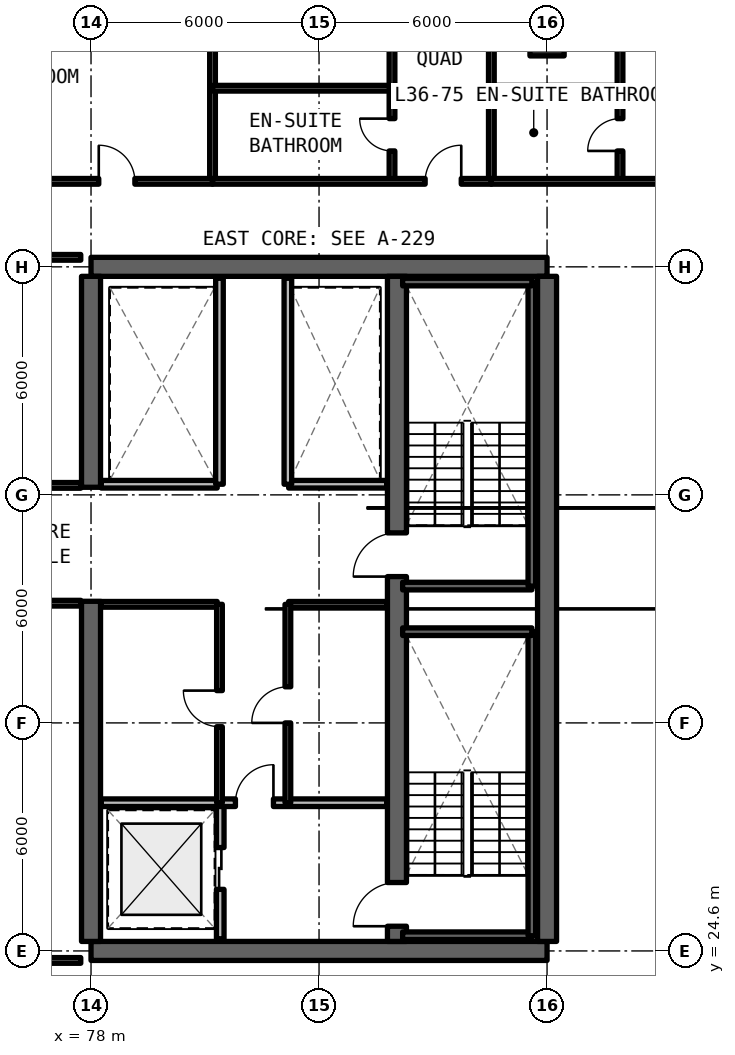
"""IFC4 building model, lengths in metres.
Left out: names, types, materials, properties, quantities, classifications, styles, units other than length and angle.
Written with IfcOpenShell. Run it as: python <this file> out.ifc"""

import sys

from ifc_helpers import new_model, si_unit, direction, frame, frame_2d, origin, origin_2d, place, context, subcontext, project, spatial, rectangle, extrude, element, fill, save


model = new_model("IFC4")
c1 = context("Model", 3, precision=1e-05, world=origin(), true_north=direction((0.0, 1.0)))
c2 = subcontext(c1, "Body", "Model", "MODEL_VIEW")
j1 = project(units=[si_unit("LENGTHUNIT", "METRE"), si_unit("PLANEANGLEUNIT", "RADIAN")], contexts=[c1])
p1 = place(None, origin())
s1 = spatial("IfcSite", under=j1, at=p1, CompositionType="ELEMENT")
p2 = place(p1, origin())
s2 = spatial("IfcBuilding", under=s1, at=p2, CompositionType="ELEMENT")
p3 = place(p2, frame((0.0, 0.0, 132.0)))
s3 = spatial("IfcBuildingStorey", under=s2, at=p3, CompositionType="ELEMENT", Elevation=132.0)
for number, where, z_axis, x_axis in (
    (1, (78.0, 24.6, 0.0), (0.0, 0.0, 1.0), (1.0, 0.0, 0.0)),
    (2, (90.0, 42.6, 0.0), (0.0, 0.0, 1.0), (-1.0, 0.0, 0.0)),
):
    element("IfcWall", number, at=place(p3, frame(where, z_axis=z_axis, x_axis=x_axis)), inside=s3, PredefinedType="SHEAR", context=c2, shape_type="SweptSolid", body=[
        extrude(rectangle(XDim=12.0, YDim=0.5, at=frame_2d((6.0, 0.0))), origin(), (0.0, 0.0, 1.0), 3.3),
    ])
p4 = place(p3, frame((90.0, 24.85, 0.0), z_axis=(0.0, 0.0, 1.0), x_axis=(0.0, 1.0, 0.0)))
e3 = element("IfcWall", 3, at=p4, inside=s3, PredefinedType="SHEAR", context=c2, shape_type="SweptSolid", body=[
    extrude(rectangle(XDim=17.5, YDim=0.5, at=frame_2d((8.75, 0.0))), origin(), (0.0, 0.0, 1.0), 3.3),
])
p5 = place(p3, frame((78.0, 24.85, 0.0), z_axis=(0.0, 0.0, 1.0), x_axis=(0.0, 1.0, 0.0)))
e4 = element("IfcWall", 4, at=p5, inside=s3, PredefinedType="SHEAR", context=c2, shape_type="SweptSolid", body=[
    extrude(rectangle(XDim=8.95, YDim=0.5, at=frame_2d((4.475, 0.0))), origin(), (0.0, 0.0, 1.0), 3.3),
])
p6 = place(p3, frame((78.0, 36.8, 0.0), z_axis=(0.0, 0.0, 1.0), x_axis=(0.0, 1.0, 0.0)))
e5 = element("IfcWall", 5, at=p6, inside=s3, PredefinedType="SHEAR", context=c2, shape_type="SweptSolid", body=[
    extrude(rectangle(XDim=5.55, YDim=0.5, at=frame_2d((2.775, 0.0))), origin(), (0.0, 0.0, 1.0), 3.3),
])
p7 = place(p3, frame((86.05, 24.85, 0.0), z_axis=(0.0, 0.0, 1.0), x_axis=(0.0, 1.0, 0.0)))
e6 = element("IfcWall", 6, at=p7, inside=s3, PredefinedType="SHEAR", context=c2, shape_type="SweptSolid", body=[
    extrude(rectangle(XDim=17.5, YDim=0.5, at=frame_2d((8.75, 0.0))), origin(), (0.0, 0.0, 1.0), 3.3),
])
p8 = place(p7, frame((0.4, 0.0, 0.0)))
e7 = element("IfcOpeningElement", 7, at=p8, cuts=e6, PredefinedType="OPENING", context=c2, shape_type="SweptSolid", body=[
    extrude(rectangle(XDim=1.15, YDim=2.15, at=frame_2d((0.575, 1.075))), frame((0.0, 0.26, 0.0), z_axis=(0.0, -1.0, 0.0), x_axis=(1.0, 0.0, 0.0)), (0.0, 0.0, 1.0), 0.52),
])
p9 = place(p7, frame((9.6, 0.0, 0.0)))
e8 = element("IfcOpeningElement", 8, at=p9, cuts=e6, PredefinedType="OPENING", context=c2, shape_type="SweptSolid", body=[
    extrude(rectangle(XDim=1.15, YDim=2.15, at=frame_2d((0.575, 1.075))), frame((0.0, 0.26, 0.0), z_axis=(0.0, -1.0, 0.0), x_axis=(1.0, 0.0, 0.0)), (0.0, 0.0, 1.0), 0.52),
])
p10 = place(p3, frame((90.0, 48.6, 0.0), z_axis=(0.0, 0.0, 1.0), x_axis=(1.0, 0.0, 0.0)))
e9 = element("IfcColumn", 9, at=p10, inside=s3, PredefinedType="COLUMN", context=c2, shape_type="SweptSolid", body=[
    extrude(rectangle(XDim=0.9, YDim=0.9, at=origin_2d()), origin(), (0.0, 0.0, 1.0), 3.3),
])
p11 = place(p3, frame((81.4, 24.92, 0.0), z_axis=(0.0, 0.0, 1.0), x_axis=(0.0, 1.0, 0.0)))
e10 = element("IfcWall", 10, at=p11, inside=s3, PredefinedType="SOLIDWALL", context=c2, shape_type="SweptSolid", body=[
    extrude(rectangle(XDim=3.58, YDim=0.2, at=frame_2d((1.79, 0.0))), origin(), (0.0, 0.0, 1.0), 2.35),
])
p12 = place(p11, frame((1.3, 0.0, 0.0)))
e11 = element("IfcOpeningElement", 11, at=p12, cuts=e10, PredefinedType="OPENING", context=c2, shape_type="SweptSolid", body=[
    extrude(rectangle(XDim=1.1, YDim=2.2, at=frame_2d((0.55, 1.1))), frame((0.0, 0.11, 0.0), z_axis=(0.0, -1.0, 0.0), x_axis=(1.0, 0.0, 0.0)), (0.0, 0.0, 1.0), 0.22),
])
p13 = place(p3, frame((78.27, 28.5, 0.0), z_axis=(0.0, 0.0, 1.0), x_axis=(1.0, 0.0, 0.0)))
e12 = element("IfcWall", 12, at=p13, inside=s3, PredefinedType="SOLIDWALL", context=c2, shape_type="SweptSolid", body=[
    extrude(rectangle(XDim=7.51, YDim=0.2, at=frame_2d((3.755, 0.0))), origin(), (0.0, 0.0, 1.0), 2.35),
])
p14 = place(p13, frame((3.53, 0.0, 0.0)))
e13 = element("IfcOpeningElement", 13, at=p14, cuts=e12, PredefinedType="OPENING", context=c2, shape_type="SweptSolid", body=[
    extrude(rectangle(XDim=1.0, YDim=2.15, at=frame_2d((0.5, 1.075))), frame((0.0, 0.11, 0.0), z_axis=(0.0, -1.0, 0.0), x_axis=(1.0, 0.0, 0.0)), (0.0, 0.0, 1.0), 0.22),
])
p15 = place(p3, frame((83.2, 33.72, 0.0), z_axis=(0.0, 0.0, 1.0), x_axis=(1.0, 0.0, 0.0)))
e14 = element("IfcWall", 14, at=p15, inside=s3, PredefinedType="SOLIDWALL", context=c2, shape_type="SweptSolid", body=[
    extrude(rectangle(XDim=2.58, YDim=0.15, at=frame_2d((1.29, 0.0))), origin(), (0.0, 0.0, 1.0), 2.35),
])
p16 = place(p3, frame((83.18, 28.5, 0.0), z_axis=(0.0, 0.0, 1.0), x_axis=(0.0, 1.0, 0.0)))
e15 = element("IfcWall", 15, at=p16, inside=s3, PredefinedType="SOLIDWALL", context=c2, shape_type="SweptSolid", body=[
    extrude(rectangle(XDim=5.22, YDim=0.15, at=frame_2d((2.61, 0.0))), origin(), (0.0, 0.0, 1.0), 2.35),
])
p17 = place(p16, frame((2.1, 0.0, 0.0)))
e16 = element("IfcOpeningElement", 16, at=p17, cuts=e15, PredefinedType="OPENING", context=c2, shape_type="SweptSolid", body=[
    extrude(rectangle(XDim=0.95, YDim=2.15, at=frame_2d((0.475, 1.075))), frame((0.0, 0.085, 0.0), z_axis=(0.0, -1.0, 0.0), x_axis=(1.0, 0.0, 0.0)), (0.0, 0.0, 1.0), 0.17),
])
p18 = place(p3, frame((78.27, 33.72, 0.0), z_axis=(0.0, 0.0, 1.0), x_axis=(1.0, 0.0, 0.0)))
e17 = element("IfcWall", 17, at=p18, inside=s3, PredefinedType="SOLIDWALL", context=c2, shape_type="SweptSolid", body=[
    extrude(rectangle(XDim=3.05, YDim=0.15, at=frame_2d((1.525, 0.0))), origin(), (0.0, 0.0, 1.0), 2.35),
])
p19 = place(p3, frame((81.38, 28.5, 0.0), z_axis=(0.0, 0.0, 1.0), x_axis=(0.0, 1.0, 0.0)))
e18 = element("IfcWall", 18, at=p19, inside=s3, PredefinedType="SOLIDWALL", context=c2, shape_type="SweptSolid", body=[
    extrude(rectangle(XDim=5.22, YDim=0.15, at=frame_2d((2.61, 0.0))), origin(), (0.0, 0.0, 1.0), 2.35),
])
p20 = place(p19, frame((2.0, 0.0, 0.0)))
e19 = element("IfcOpeningElement", 19, at=p20, cuts=e18, PredefinedType="OPENING", context=c2, shape_type="SweptSolid", body=[
    extrude(rectangle(XDim=0.95, YDim=2.15, at=frame_2d((0.475, 1.075))), frame((0.0, 0.085, 0.0), z_axis=(0.0, -1.0, 0.0), x_axis=(1.0, 0.0, 0.0)), (0.0, 0.0, 1.0), 0.17),
])
p21 = place(p3, frame((83.2, 36.88, 0.0), z_axis=(0.0, 0.0, 1.0), x_axis=(1.0, 0.0, 0.0)))
e20 = element("IfcWall", 20, at=p21, inside=s3, PredefinedType="SOLIDWALL", context=c2, shape_type="SweptSolid", body=[
    extrude(rectangle(XDim=2.58, YDim=0.2, at=frame_2d((1.29, 0.0))), origin(), (0.0, 0.0, 1.0), 2.35),
])
p22 = place(p3, frame((83.18, 36.88, 0.0), z_axis=(0.0, 0.0, 1.0), x_axis=(0.0, 1.0, 0.0)))
e21 = element("IfcWall", 21, at=p22, inside=s3, PredefinedType="SOLIDWALL", context=c2, shape_type="SweptSolid", body=[
    extrude(rectangle(XDim=5.42, YDim=0.2, at=frame_2d((2.71, 0.0))), origin(), (0.0, 0.0, 1.0), 2.35),
])
p23 = place(p3, frame((78.27, 36.88, 0.0), z_axis=(0.0, 0.0, 1.0), x_axis=(1.0, 0.0, 0.0)))
e22 = element("IfcWall", 22, at=p23, inside=s3, PredefinedType="SOLIDWALL", context=c2, shape_type="SweptSolid", body=[
    extrude(rectangle(XDim=3.05, YDim=0.2, at=frame_2d((1.525, 0.0))), origin(), (0.0, 0.0, 1.0), 2.35),
])
p24 = place(p3, frame((81.38, 36.88, 0.0), z_axis=(0.0, 0.0, 1.0), x_axis=(0.0, 1.0, 0.0)))
e23 = element("IfcWall", 23, at=p24, inside=s3, PredefinedType="SOLIDWALL", context=c2, shape_type="SweptSolid", body=[
    extrude(rectangle(XDim=5.42, YDim=0.2, at=frame_2d((2.71, 0.0))), origin(), (0.0, 0.0, 1.0), 2.35),
])
p25 = place(p3, frame((69.85, 24.35, 0.0), z_axis=(0.0, 0.0, 1.0), x_axis=(1.0, 0.0, 0.0)))
e24 = element("IfcWall", 24, at=p25, inside=s3, PredefinedType="SOLIDWALL", context=c2, shape_type="SweptSolid", body=[
    extrude(rectangle(XDim=7.88, YDim=0.15, at=frame_2d((3.94, 0.0))), origin(), (0.0, 0.0, 1.0), 2.35),
])
p26 = place(p3, frame((69.85, 33.75, 0.0), z_axis=(0.0, 0.0, 1.0), x_axis=(1.0, 0.0, 0.0)))
e25 = element("IfcWall", 25, at=p26, inside=s3, PredefinedType="SOLIDWALL", context=c2, shape_type="SweptSolid", body=[
    extrude(rectangle(XDim=7.88, YDim=0.15, at=frame_2d((3.94, 0.0))), origin(), (0.0, 0.0, 1.0), 2.35),
])
p27 = place(p26, frame((3.465, 0.0, 0.0)))
e26 = element("IfcOpeningElement", 26, at=p27, cuts=e25, PredefinedType="OPENING", context=c2, shape_type="SweptSolid", body=[
    extrude(rectangle(XDim=0.95, YDim=2.15, at=frame_2d((0.475, 1.075))), frame((0.0, 0.085, 0.0), z_axis=(0.0, -1.0, 0.0), x_axis=(1.0, 0.0, 0.0)), (0.0, 0.0, 1.0), 0.17),
])
p28 = place(p3, frame((69.85, 36.85, 0.0), z_axis=(0.0, 0.0, 1.0), x_axis=(1.0, 0.0, 0.0)))
e27 = element("IfcWall", 27, at=p28, inside=s3, PredefinedType="SOLIDWALL", context=c2, shape_type="SweptSolid", body=[
    extrude(rectangle(XDim=7.88, YDim=0.15, at=frame_2d((3.94, 0.0))), origin(), (0.0, 0.0, 1.0), 2.35),
])
p29 = place(p28, frame((3.465, 0.0, 0.0)))
e28 = element("IfcOpeningElement", 28, at=p29, cuts=e27, PredefinedType="OPENING", context=c2, shape_type="SweptSolid", body=[
    extrude(rectangle(XDim=0.95, YDim=2.15, at=frame_2d((0.475, 1.075))), frame((0.0, 0.085, 0.0), z_axis=(0.0, -1.0, 0.0), x_axis=(1.0, 0.0, 0.0)), (0.0, 0.0, 1.0), 0.17),
])
p30 = place(p3, frame((69.85, 42.85, 0.0), z_axis=(0.0, 0.0, 1.0), x_axis=(1.0, 0.0, 0.0)))
e29 = element("IfcWall", 29, at=p30, inside=s3, PredefinedType="SOLIDWALL", context=c2, shape_type="SweptSolid", body=[
    extrude(rectangle(XDim=7.88, YDim=0.15, at=frame_2d((3.94, 0.0))), origin(), (0.0, 0.0, 1.0), 2.35),
])
p31 = place(p3, frame((81.197, 44.85, 0.0), z_axis=(0.0, 0.0, 1.0), x_axis=(0.0, 1.0, 0.0)))
e30 = element("IfcWall", 30, at=p31, inside=s3, PredefinedType="SOLIDWALL", context=c2, shape_type="SweptSolid", body=[
    extrude(rectangle(XDim=10.2, YDim=0.15, at=frame_2d((5.1, 0.0))), origin(), (0.0, 0.0, 1.0), 2.35),
])
p32 = place(p3, frame((74.132, 44.85, 0.0), z_axis=(0.0, 0.0, 1.0), x_axis=(1.0, 0.0, 0.0)))
e31 = element("IfcWall", 31, at=p32, inside=s3, PredefinedType="SOLIDWALL", context=c2, shape_type="SweptSolid", body=[
    extrude(rectangle(XDim=7.066, YDim=0.15, at=frame_2d((3.533, 0.0))), origin(), (0.0, 0.0, 1.0), 2.35),
])
p33 = place(p32, frame((4.072, 0.0, 0.0)))
e32 = element("IfcOpeningElement", 32, at=p33, cuts=e31, PredefinedType="OPENING", context=c2, shape_type="SweptSolid", body=[
    extrude(rectangle(XDim=0.95, YDim=2.15, at=frame_2d((0.475, 1.075))), frame((0.0, 0.085, 0.0), z_axis=(0.0, -1.0, 0.0), x_axis=(1.0, 0.0, 0.0)), (0.0, 0.0, 1.0), 0.17),
])
p34 = place(p3, frame((88.534, 44.85, 0.0), z_axis=(0.0, 0.0, 1.0), x_axis=(0.0, 1.0, 0.0)))
e33 = element("IfcWall", 33, at=p34, inside=s3, PredefinedType="SOLIDWALL", context=c2, shape_type="SweptSolid", body=[
    extrude(rectangle(XDim=10.2, YDim=0.15, at=frame_2d((5.1, 0.0))), origin(), (0.0, 0.0, 1.0), 2.35),
])
p35 = place(p3, frame((81.197, 47.3, 0.0), z_axis=(0.0, 0.0, 1.0), x_axis=(1.0, 0.0, 0.0)))
e34 = element("IfcWall", 34, at=p35, inside=s3, PredefinedType="PARTITIONING", context=c2, shape_type="SweptSolid", body=[
    extrude(rectangle(XDim=4.723, YDim=0.15, at=frame_2d((2.361, 0.0))), origin(), (0.0, 0.0, 1.0), 2.35),
])
p36 = place(p3, frame((85.92, 44.85, 0.0), z_axis=(0.0, 0.0, 1.0), x_axis=(0.0, 1.0, 0.0)))
e35 = element("IfcWall", 35, at=p36, inside=s3, PredefinedType="PARTITIONING", context=c2, shape_type="SweptSolid", body=[
    extrude(rectangle(XDim=10.2, YDim=0.15, at=frame_2d((5.1, 0.0))), origin(), (0.0, 0.0, 1.0), 2.35),
])
p37 = place(p36, frame((0.8, 0.0, 0.0)))
e36 = element("IfcOpeningElement", 36, at=p37, cuts=e35, PredefinedType="OPENING", context=c2, shape_type="SweptSolid", body=[
    extrude(rectangle(XDim=0.85, YDim=2.1, at=frame_2d((0.425, 1.05))), frame((0.0, 0.085, 0.0), z_axis=(0.0, -1.0, 0.0), x_axis=(1.0, 0.0, 0.0)), (0.0, 0.0, 1.0), 0.17),
])
p38 = place(p36, frame((5.21, 0.0, 0.0)))
e37 = element("IfcOpeningElement", 37, at=p38, cuts=e35, PredefinedType="OPENING", context=c2, shape_type="SweptSolid", body=[
    extrude(rectangle(XDim=0.85, YDim=2.1, at=frame_2d((0.425, 1.05))), frame((0.0, 0.085, 0.0), z_axis=(0.0, -1.0, 0.0), x_axis=(1.0, 0.0, 0.0)), (0.0, 0.0, 1.0), 0.17),
])
p39 = place(p3, frame((81.197, 44.85, 0.0), z_axis=(0.0, 0.0, 1.0), x_axis=(1.0, 0.0, 0.0)))
e38 = element("IfcWall", 38, at=p39, inside=s3, PredefinedType="SOLIDWALL", context=c2, shape_type="SweptSolid", body=[
    extrude(rectangle(XDim=7.337, YDim=0.15, at=frame_2d((3.668, 0.0))), origin(), (0.0, 0.0, 1.0), 2.35),
])
p40 = place(p39, frame((5.595, 0.0, 0.0)))
e39 = element("IfcOpeningElement", 39, at=p40, cuts=e38, PredefinedType="OPENING", context=c2, shape_type="SweptSolid", body=[
    extrude(rectangle(XDim=0.95, YDim=2.15, at=frame_2d((0.475, 1.075))), frame((0.0, 0.085, 0.0), z_axis=(0.0, -1.0, 0.0), x_axis=(1.0, 0.0, 0.0)), (0.0, 0.0, 1.0), 0.17),
])
p41 = place(p3, frame((88.534, 47.3, 0.0), z_axis=(0.0, 0.0, 1.0), x_axis=(1.0, 0.0, 0.0)))
e40 = element("IfcWall", 40, at=p41, inside=s3, PredefinedType="PARTITIONING", context=c2, shape_type="SweptSolid", body=[
    extrude(rectangle(XDim=3.385, YDim=0.15, at=frame_2d((1.693, 0.0))), origin(), (0.0, 0.0, 1.0), 2.35),
])
p42 = place(p3, frame((91.92, 44.85, 0.0), z_axis=(0.0, 0.0, 1.0), x_axis=(0.0, 1.0, 0.0)))
e41 = element("IfcWall", 41, at=p42, inside=s3, PredefinedType="PARTITIONING", context=c2, shape_type="SweptSolid", body=[
    extrude(rectangle(XDim=10.2, YDim=0.15, at=frame_2d((5.1, 0.0))), origin(), (0.0, 0.0, 1.0), 2.35),
])
p43 = place(p42, frame((0.8, 0.0, 0.0)))
e42 = element("IfcOpeningElement", 42, at=p43, cuts=e41, PredefinedType="OPENING", context=c2, shape_type="SweptSolid", body=[
    extrude(rectangle(XDim=0.85, YDim=2.1, at=frame_2d((0.425, 1.05))), frame((0.0, 0.085, 0.0), z_axis=(0.0, -1.0, 0.0), x_axis=(1.0, 0.0, 0.0)), (0.0, 0.0, 1.0), 0.17),
])
p44 = place(p42, frame((5.21, 0.0, 0.0)))
e43 = element("IfcOpeningElement", 43, at=p44, cuts=e41, PredefinedType="OPENING", context=c2, shape_type="SweptSolid", body=[
    extrude(rectangle(XDim=0.85, YDim=2.1, at=frame_2d((0.425, 1.05))), frame((0.0, 0.085, 0.0), z_axis=(0.0, -1.0, 0.0), x_axis=(1.0, 0.0, 0.0)), (0.0, 0.0, 1.0), 0.17),
])
p45 = place(p3, frame((88.534, 44.85, 0.0), z_axis=(0.0, 0.0, 1.0), x_axis=(1.0, 0.0, 0.0)))
e44 = element("IfcWall", 44, at=p45, inside=s3, PredefinedType="SOLIDWALL", context=c2, shape_type="SweptSolid", body=[
    extrude(rectangle(XDim=7.066, YDim=0.15, at=frame_2d((3.533, 0.0))), origin(), (0.0, 0.0, 1.0), 2.35),
])
p46 = place(p45, frame((4.791, 0.0, 0.0)))
e45 = element("IfcOpeningElement", 45, at=p46, cuts=e44, PredefinedType="OPENING", context=c2, shape_type="SweptSolid", body=[
    extrude(rectangle(XDim=0.95, YDim=2.15, at=frame_2d((0.475, 1.075))), frame((0.0, 0.085, 0.0), z_axis=(0.0, -1.0, 0.0), x_axis=(1.0, 0.0, 0.0)), (0.0, 0.0, 1.0), 0.17),
])
p47 = place(p3, frame((86.2, 25.0, 0.0), z_axis=(0.0, 0.0, 1.0), x_axis=(1.0, 0.0, 0.0)))
e46 = element("IfcWall", 46, at=p47, inside=s3, PredefinedType="SOLIDWALL", context=c2, shape_type="SweptSolid", body=[
    extrude(rectangle(XDim=3.4, YDim=0.2, at=frame_2d((1.7, 0.0))), origin(), (0.0, 0.0, 1.0), 3.3),
])
p48 = place(p3, frame((89.6, 25.0, 0.0), z_axis=(0.0, 0.0, 1.0), x_axis=(0.0, 1.0, 0.0)))
e47 = element("IfcWall", 47, at=p48, inside=s3, PredefinedType="SOLIDWALL", context=c2, shape_type="SweptSolid", body=[
    extrude(rectangle(XDim=8.0, YDim=0.2, at=frame_2d((4.0, 0.0))), origin(), (0.0, 0.0, 1.0), 3.3),
])
for number, where, z_axis, x_axis in (
    (48, (89.6, 33.0, 0.0), (0.0, 0.0, 1.0), (-1.0, 0.0, 0.0)),
    (49, (86.2, 34.2, 0.0), (0.0, 0.0, 1.0), (1.0, 0.0, 0.0)),
):
    element("IfcWall", number, at=place(p3, frame(where, z_axis=z_axis, x_axis=x_axis)), inside=s3, PredefinedType="SOLIDWALL", context=c2, shape_type="SweptSolid", body=[
        extrude(rectangle(XDim=3.4, YDim=0.2, at=frame_2d((1.7, 0.0))), origin(), (0.0, 0.0, 1.0), 3.3),
    ])
p49 = place(p3, frame((89.6, 34.2, 0.0), z_axis=(0.0, 0.0, 1.0), x_axis=(0.0, 1.0, 0.0)))
e50 = element("IfcWall", 50, at=p49, inside=s3, PredefinedType="SOLIDWALL", context=c2, shape_type="SweptSolid", body=[
    extrude(rectangle(XDim=8.0, YDim=0.2, at=frame_2d((4.0, 0.0))), origin(), (0.0, 0.0, 1.0), 3.3),
])
p50 = place(p3, frame((89.6, 42.2, 0.0), z_axis=(0.0, 0.0, 1.0), x_axis=(-1.0, 0.0, 0.0)))
e51 = element("IfcWall", 51, at=p50, inside=s3, PredefinedType="SOLIDWALL", context=c2, shape_type="SweptSolid", body=[
    extrude(rectangle(XDim=3.4, YDim=0.2, at=frame_2d((1.7, 0.0))), origin(), (0.0, 0.0, 1.0), 3.3),
])
p51 = place(p12, origin())
e52 = element("IfcDoor", 52, at=p51, inside=s3, OperationType="SLIDING_TO_LEFT", PredefinedType="DOOR", context=c2, shape_type="SweptSolid", body=[
    extrude(rectangle(XDim=1.1, YDim=2.2, at=frame_2d((0.55, 1.1))), frame((0.0, 0.025, 0.0), z_axis=(0.0, -1.0, 0.0), x_axis=(1.0, 0.0, 0.0)), (0.0, 0.0, 1.0), 0.05),
])
fill(e11, e52)
p52 = place(p14, origin())
e53 = element("IfcDoor", 53, at=p52, inside=s3, OperationType="SINGLE_SWING_RIGHT", PredefinedType="DOOR", context=c2, shape_type="SweptSolid", body=[
    extrude(rectangle(XDim=1.0, YDim=2.15, at=frame_2d((0.5, 1.075))), frame((0.0, 0.025, 0.0), z_axis=(0.0, -1.0, 0.0), x_axis=(1.0, 0.0, 0.0)), (0.0, 0.0, 1.0), 0.05),
])
fill(e13, e53)
p53 = place(p17, origin())
e54 = element("IfcDoor", 54, at=p53, inside=s3, OperationType="SINGLE_SWING_LEFT", PredefinedType="DOOR", context=c2, shape_type="SweptSolid", body=[
    extrude(rectangle(XDim=0.95, YDim=2.15, at=frame_2d((0.475, 1.075))), frame((0.0, 0.025, 0.0), z_axis=(0.0, -1.0, 0.0), x_axis=(1.0, 0.0, 0.0)), (0.0, 0.0, 1.0), 0.05),
])
fill(e16, e54)
p54 = place(p20, origin())
e55 = element("IfcDoor", 55, at=p54, inside=s3, OperationType="SINGLE_SWING_RIGHT", PredefinedType="DOOR", context=c2, shape_type="SweptSolid", body=[
    extrude(rectangle(XDim=0.95, YDim=2.15, at=frame_2d((0.475, 1.075))), frame((0.0, 0.025, 0.0), z_axis=(0.0, -1.0, 0.0), x_axis=(1.0, 0.0, 0.0)), (0.0, 0.0, 1.0), 0.05),
])
fill(e19, e55)
p55 = place(p33, origin())
e56 = element("IfcDoor", 56, at=p55, inside=s3, OperationType="SINGLE_SWING_LEFT", PredefinedType="DOOR", context=c2, shape_type="SweptSolid", body=[
    extrude(rectangle(XDim=0.95, YDim=2.15, at=frame_2d((0.475, 1.075))), frame((0.0, 0.025, 0.0), z_axis=(0.0, -1.0, 0.0), x_axis=(1.0, 0.0, 0.0)), (0.0, 0.0, 1.0), 0.05),
])
fill(e32, e56)
p56 = place(p37, origin())
e57 = element("IfcDoor", 57, at=p56, inside=s3, OperationType="SINGLE_SWING_RIGHT", PredefinedType="DOOR", context=c2, shape_type="SweptSolid", body=[
    extrude(rectangle(XDim=0.85, YDim=2.1, at=frame_2d((0.425, 1.05))), frame((0.0, 0.025, 0.0), z_axis=(0.0, -1.0, 0.0), x_axis=(1.0, 0.0, 0.0)), (0.0, 0.0, 1.0), 0.05),
])
fill(e36, e57)
p57 = place(p40, origin())
e58 = element("IfcDoor", 58, at=p57, inside=s3, OperationType="SINGLE_SWING_RIGHT", PredefinedType="DOOR", context=c2, shape_type="SweptSolid", body=[
    extrude(rectangle(XDim=0.95, YDim=2.15, at=frame_2d((0.475, 1.075))), frame((0.0, 0.025, 0.0), z_axis=(0.0, -1.0, 0.0), x_axis=(1.0, 0.0, 0.0)), (0.0, 0.0, 1.0), 0.05),
])
fill(e39, e58)
p58 = place(p43, origin())
e59 = element("IfcDoor", 59, at=p58, inside=s3, OperationType="SINGLE_SWING_LEFT", PredefinedType="DOOR", context=c2, shape_type="SweptSolid", body=[
    extrude(rectangle(XDim=0.85, YDim=2.1, at=frame_2d((0.425, 1.05))), frame((0.0, 0.025, 0.0), z_axis=(0.0, -1.0, 0.0), x_axis=(1.0, 0.0, 0.0)), (0.0, 0.0, 1.0), 0.05),
])
fill(e42, e59)
p59 = place(p8, origin())
e60 = element("IfcDoor", 60, at=p59, inside=s3, OperationType="SINGLE_SWING_RIGHT", PredefinedType="DOOR", context=c2, shape_type="SweptSolid", body=[
    extrude(rectangle(XDim=1.15, YDim=2.15, at=frame_2d((0.575, 1.075))), frame((0.0, 0.025, 0.0), z_axis=(0.0, -1.0, 0.0), x_axis=(1.0, 0.0, 0.0)), (0.0, 0.0, 1.0), 0.05),
])
fill(e7, e60)
p60 = place(p9, origin())
e61 = element("IfcDoor", 61, at=p60, inside=s3, OperationType="SINGLE_SWING_LEFT", PredefinedType="DOOR", context=c2, shape_type="SweptSolid", body=[
    extrude(rectangle(XDim=1.15, YDim=2.15, at=frame_2d((0.575, 1.075))), frame((0.0, 0.025, 0.0), z_axis=(0.0, -1.0, 0.0), x_axis=(1.0, 0.0, 0.0)), (0.0, 0.0, 1.0), 0.05),
])
fill(e8, e61)
save(model, sys.argv[1])
